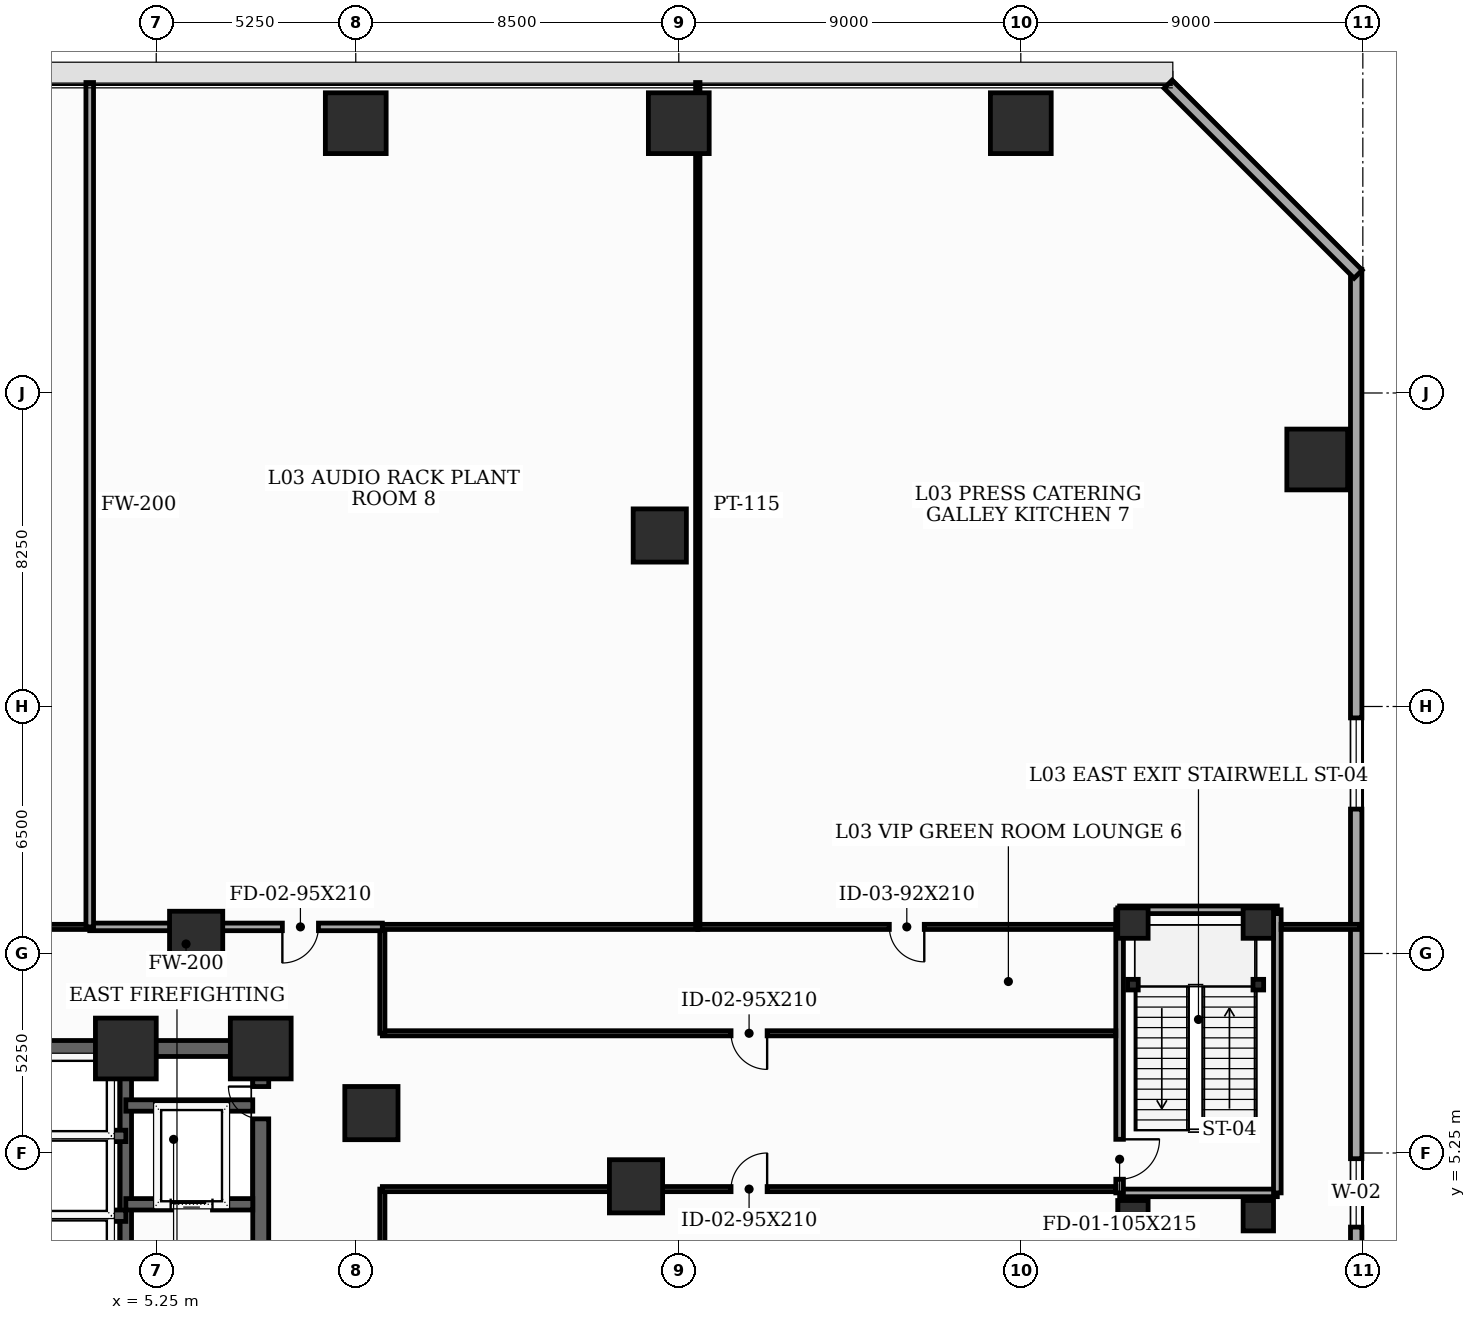
"""IFC4 building model, lengths in metres.
Left out: names, types, materials, properties, quantities, classifications, styles, units other than length and angle.
Written with IfcOpenShell. Run it as: python <this file> out.ifc"""

import sys

from ifc_helpers import new_model, si_unit, direction, frame, frame_2d, origin, origin_2d, place, context, subcontext, project, spatial, rectangle, i_section, extrude, element, fill, save


model = new_model("IFC4")
c1 = context("Model", 3, precision=1e-05, world=origin(), true_north=direction((0.0, 1.0)))
c2 = subcontext(c1, "Body", "Model", "MODEL_VIEW")
j1 = project(units=[si_unit("LENGTHUNIT", "METRE"), si_unit("PLANEANGLEUNIT", "RADIAN")], contexts=[c1])
p1 = place(None, origin())
s1 = spatial("IfcSite", under=j1, at=p1, CompositionType="ELEMENT")
p2 = place(p1, origin())
s2 = spatial("IfcBuilding", under=s1, at=p2, CompositionType="ELEMENT")
p3 = place(p2, frame((0.0, 0.0, 15.6)))
s3 = spatial("IfcBuildingStorey", under=s2, at=p3, CompositionType="ELEMENT", Elevation=15.6)
for number, where, z_axis, x_axis in (
    (1, (8.0, 8.0, 0.0), (0.0, 0.0, 1.0), (1.0, 0.0, 0.0)),
    (2, (4.45, 8.0, 0.0), (0.0, 0.0, 1.0), (1.0, 0.0, 0.0)),
):
    element("IfcColumn", number, at=place(p3, frame(where, z_axis=z_axis, x_axis=x_axis)), inside=s3, PredefinedType="COLUMN", context=c2, shape_type="SweptSolid", body=[
        extrude(rectangle(XDim=1.6, YDim=1.6, at=origin_2d()), origin(), (0.0, 0.0, 1.0), 5.2),
    ])
for number, where, z_axis, x_axis in (
    (3, (10.912, 6.3, 0.0), (0.0, 0.0, 1.0), (1.0, 0.0, 0.0)),
    (4, (6.3, 10.912, 0.0), (0.0, 0.0, 1.0), (1.0, 0.0, 0.0)),
):
    element("IfcColumn", number, at=place(p3, frame(where, z_axis=z_axis, x_axis=x_axis)), inside=s3, PredefinedType="COLUMN", context=c2, shape_type="SweptSolid", body=[
        extrude(rectangle(XDim=1.4, YDim=1.4, at=origin_2d()), origin(), (0.0, 0.0, 1.0), 5.2),
    ])
for number, where, z_axis, x_axis in (
    (5, (35.8, 23.5, 0.0), (0.0, 0.0, 1.0), (1.0, 0.0, 0.0)),
    (6, (28.0, 32.35, 0.0), (0.0, 0.0, 1.0), (1.0, 0.0, 0.0)),
    (7, (19.0, 32.35, 0.0), (0.0, 0.0, 1.0), (1.0, 0.0, 0.0)),
    (8, (10.5, 32.35, 0.0), (0.0, 0.0, 1.0), (1.0, 0.0, 0.0)),
):
    element("IfcColumn", number, at=place(p3, frame(where, z_axis=z_axis, x_axis=x_axis)), inside=s3, PredefinedType="COLUMN", context=c2, shape_type="SweptSolid", body=[
        extrude(rectangle(XDim=1.6, YDim=1.6, at=origin_2d()), origin(), (0.0, 0.0, 1.0), 5.2),
    ])
for number, where, z_axis, x_axis in (
    (9, (18.5, 21.5, 0.0), (0.0, 0.0, 1.0), (1.0, 0.0, 0.0)),
    (10, (17.875, 4.373, 0.0), (0.0, 0.0, 1.0), (1.0, 0.0, 0.0)),
):
    element("IfcColumn", number, at=place(p3, frame(where, z_axis=z_axis, x_axis=x_axis)), inside=s3, PredefinedType="COLUMN", context=c2, shape_type="SweptSolid", body=[
        extrude(rectangle(XDim=1.4, YDim=1.4, at=origin_2d()), origin(), (0.0, 0.0, 1.0), 5.2),
    ])
for number, where, z_axis, x_axis in (
    (11, (30.95, 3.6, 0.0), (0.0, 0.0, 1.0), (1.0, 0.0, 0.0)),
    (12, (34.25, 3.6, 0.0), (0.0, 0.0, 1.0), (1.0, 0.0, 0.0)),
    (13, (34.25, 11.3, 0.0), (0.0, 0.0, 1.0), (1.0, 0.0, 0.0)),
    (14, (30.95, 11.3, 0.0), (0.0, 0.0, 1.0), (1.0, 0.0, 0.0)),
):
    element("IfcColumn", number, at=place(p3, frame(where, z_axis=z_axis, x_axis=x_axis)), inside=s3, PredefinedType="COLUMN", context=c2, shape_type="SweptSolid", body=[
        extrude(rectangle(XDim=0.8, YDim=0.8, at=origin_2d()), origin(), (0.0, 0.0, 1.0), 5.2),
    ])
for number, where, z_axis, x_axis in (
    (15, (30.95, 9.68, 0.0), (0.0, 0.0, 1.0), (1.0, 0.0, 0.0)),
    (16, (34.25, 9.68, 0.0), (0.0, 0.0, 1.0), (1.0, 0.0, 0.0)),
):
    element("IfcColumn", number, at=place(p3, frame(where, z_axis=z_axis, x_axis=x_axis)), inside=s3, PredefinedType="PILASTER", context=c2, shape_type="SweptSolid", body=[
        extrude(i_section(OverallWidth=0.28, OverallDepth=0.28, WebThickness=0.01, FlangeThickness=0.018, at=origin_2d()), origin(), (0.0, 0.0, 1.0), 5.2),
    ])
p4 = place(p3, frame((36.825, -19.5, 0.0), z_axis=(0.0, 0.0, 1.0), x_axis=(0.0, 1.0, 0.0)))
e17 = element("IfcWall", 17, at=p4, inside=s3, PredefinedType="SOLIDWALL", context=c2, shape_type="SweptSolid", body=[
    extrude(rectangle(XDim=48.0, YDim=0.3, at=frame_2d((24.0, 0.0))), origin(), (0.0, 0.0, 1.0), 4.95),
])
p5 = place(p4, frame((3.6, 0.0, 0.9)))
e18 = element("IfcOpeningElement", 18, at=p5, cuts=e17, PredefinedType="OPENING", context=c2, shape_type="SweptSolid", body=[
    extrude(rectangle(XDim=2.4, YDim=1.35, at=frame_2d((1.2, 0.675))), frame((0.0, 0.16, 0.0), z_axis=(0.0, -1.0, 0.0), x_axis=(1.0, 0.0, 0.0)), (0.0, 0.0, 1.0), 0.32),
])
p6 = place(p4, frame((22.8, 0.0, 0.9)))
e19 = element("IfcOpeningElement", 19, at=p6, cuts=e17, PredefinedType="OPENING", context=c2, shape_type="SweptSolid", body=[
    extrude(rectangle(XDim=1.8, YDim=1.35, at=frame_2d((0.9, 0.675))), frame((0.0, 0.16, 0.0), z_axis=(0.0, -1.0, 0.0), x_axis=(1.0, 0.0, 0.0)), (0.0, 0.0, 1.0), 0.32),
])
p7 = place(p4, frame((33.8, 0.0, 0.9)))
e20 = element("IfcOpeningElement", 20, at=p7, cuts=e17, PredefinedType="OPENING", context=c2, shape_type="SweptSolid", body=[
    extrude(rectangle(XDim=2.4, YDim=1.35, at=frame_2d((1.2, 0.675))), frame((0.0, 0.16, 0.0), z_axis=(0.0, -1.0, 0.0), x_axis=(1.0, 0.0, 0.0)), (0.0, 0.0, 1.0), 0.32),
])
p8 = place(p3, frame((36.876, 28.376, 0.0), z_axis=(0.0, 0.0, 1.0), x_axis=(-0.707106781187, 0.707106781187, 0.0)))
e21 = element("IfcWall", 21, at=p8, inside=s3, PredefinedType="SOLIDWALL", context=c2, shape_type="SweptSolid", body=[
    extrude(rectangle(XDim=7.071, YDim=0.3, at=frame_2d((3.536, 0.0))), origin(), (0.0, 0.0, 1.0), 4.95),
])
p9 = place(p3, frame((8.0, -8.0, 0.0), z_axis=(0.0, 0.0, 1.0), x_axis=(0.0, 1.0, 0.0)))
e22 = element("IfcWall", 22, at=p9, inside=s3, PredefinedType="SHEAR", context=c2, shape_type="SweptSolid", body=[
    extrude(rectangle(XDim=16.0, YDim=0.42, at=frame_2d((8.0, 0.0))), origin(), (0.0, 0.0, 1.0), 4.95),
])
p10 = place(p9, frame((9.6, 0.0, 0.0)))
e23 = element("IfcOpeningElement", 23, at=p10, cuts=e22, PredefinedType="OPENING", context=c2, shape_type="SweptSolid", body=[
    extrude(rectangle(XDim=1.05, YDim=2.15, at=frame_2d((0.525, 1.075))), frame((0.0, 0.22, 0.0), z_axis=(0.0, -1.0, 0.0), x_axis=(1.0, 0.0, 0.0)), (0.0, 0.0, 1.0), 0.44),
])
p11 = place(p9, frame((14.148, 0.0, 0.0)))
e24 = element("IfcOpeningElement", 24, at=p11, cuts=e22, PredefinedType="OPENING", context=c2, shape_type="SweptSolid", body=[
    extrude(rectangle(XDim=0.85, YDim=2.02, at=frame_2d((0.425, 1.01))), frame((0.0, 0.22, 0.0), z_axis=(0.0, -1.0, 0.0), x_axis=(1.0, 0.0, 0.0)), (0.0, 0.0, 1.0), 0.44),
])
p12 = place(p3, frame((-8.0, 8.0, 0.0), z_axis=(0.0, 0.0, 1.0), x_axis=(1.0, 0.0, 0.0)))
e25 = element("IfcWall", 25, at=p12, inside=s3, PredefinedType="SHEAR", context=c2, shape_type="SweptSolid", body=[
    extrude(rectangle(XDim=16.0, YDim=0.42, at=frame_2d((8.0, 0.0))), origin(), (0.0, 0.0, 1.0), 4.95),
])
p13 = place(p12, frame((7.1, 0.0, 0.0)))
e26 = element("IfcOpeningElement", 26, at=p13, cuts=e25, PredefinedType="OPENING", context=c2, shape_type="SweptSolid", body=[
    extrude(rectangle(XDim=1.8, YDim=2.15, at=frame_2d((0.9, 1.075))), frame((0.0, 0.22, 0.0), z_axis=(0.0, -1.0, 0.0), x_axis=(1.0, 0.0, 0.0)), (0.0, 0.0, 1.0), 0.44),
])
p14 = place(p3, frame((4.45, -7.79, 0.0), z_axis=(0.0, 0.0, 1.0), x_axis=(0.0, 1.0, 0.0)))
e27 = element("IfcWall", 27, at=p14, inside=s3, PredefinedType="SHEAR", context=c2, shape_type="SweptSolid", body=[
    extrude(rectangle(XDim=15.58, YDim=0.3, at=frame_2d((7.79, 0.0))), origin(), (0.0, 0.0, 1.0), 4.95),
])
p15 = place(p3, frame((4.45, 3.9, 0.0), z_axis=(0.0, 0.0, 1.0), x_axis=(1.0, 0.0, 0.0)))
e28 = element("IfcWall", 28, at=p15, inside=s3, PredefinedType="SHEAR", context=c2, shape_type="SweptSolid", body=[
    extrude(rectangle(XDim=3.34, YDim=0.3, at=frame_2d((1.67, 0.0))), origin(), (0.0, 0.0, 1.0), 4.95),
])
p16 = place(p15, frame((1.18, 0.0, 0.0)))
e29 = element("IfcOpeningElement", 29, at=p16, cuts=e28, PredefinedType="OPENING", context=c2, shape_type="SweptSolid", body=[
    extrude(rectangle(XDim=1.1, YDim=2.1, at=frame_2d((0.55, 1.05))), frame((0.0, 0.16, 0.0), z_axis=(0.0, -1.0, 0.0), x_axis=(1.0, 0.0, 0.0)), (0.0, 0.0, 1.0), 0.32),
])
p17 = place(p3, frame((4.45, 6.5, 0.0), z_axis=(0.0, 0.0, 1.0), x_axis=(1.0, 0.0, 0.0)))
e30 = element("IfcWall", 30, at=p17, inside=s3, PredefinedType="SHEAR", context=c2, shape_type="SweptSolid", body=[
    extrude(rectangle(XDim=3.34, YDim=0.3, at=frame_2d((1.67, 0.0))), origin(), (0.0, 0.0, 1.0), 4.95),
])
for number, where, z_axis, x_axis in (
    (31, (1.68, 3.6, 0.0), (0.0, 0.0, 1.0), (1.0, 0.0, 0.0)),
    (32, (1.68, 5.7, 0.0), (0.0, 0.0, 1.0), (1.0, 0.0, 0.0)),
):
    element("IfcWall", number, at=place(p3, frame(where, z_axis=z_axis, x_axis=x_axis)), inside=s3, PredefinedType="SHEAR", context=c2, shape_type="SweptSolid", body=[
        extrude(rectangle(XDim=2.77, YDim=0.3, at=frame_2d((1.385, 0.0))), origin(), (0.0, 0.0, 1.0), 4.95),
    ])
p18 = place(p3, frame((30.6, 4.2, 0.0), z_axis=(0.0, 0.0, 1.0), x_axis=(1.0, 0.0, 0.0)))
e33 = element("IfcWall", 33, at=p18, inside=s3, PredefinedType="SOLIDWALL", context=c2, shape_type="SweptSolid", body=[
    extrude(rectangle(XDim=4.15, YDim=0.2, at=frame_2d((2.075, 0.0))), origin(), (0.0, 0.0, 1.0), 4.95),
])
p19 = place(p3, frame((34.75, 4.2, 0.0), z_axis=(0.0, 0.0, 1.0), x_axis=(0.0, 1.0, 0.0)))
e34 = element("IfcWall", 34, at=p19, inside=s3, PredefinedType="SOLIDWALL", context=c2, shape_type="SweptSolid", body=[
    extrude(rectangle(XDim=7.45, YDim=0.2, at=frame_2d((3.725, 0.0))), origin(), (0.0, 0.0, 1.0), 4.95),
])
p20 = place(p3, frame((34.75, 11.65, 0.0), z_axis=(0.0, 0.0, 1.0), x_axis=(-1.0, 0.0, 0.0)))
e35 = element("IfcWall", 35, at=p20, inside=s3, PredefinedType="SOLIDWALL", context=c2, shape_type="SweptSolid", body=[
    extrude(rectangle(XDim=4.15, YDim=0.2, at=frame_2d((2.075, 0.0))), origin(), (0.0, 0.0, 1.0), 4.95),
])
p21 = place(p3, frame((30.6, 11.65, 0.0), z_axis=(0.0, 0.0, 1.0), x_axis=(0.0, -1.0, 0.0)))
e36 = element("IfcWall", 36, at=p21, inside=s3, PredefinedType="SOLIDWALL", context=c2, shape_type="SweptSolid", body=[
    extrude(rectangle(XDim=7.45, YDim=0.2, at=frame_2d((3.725, 0.0))), origin(), (0.0, 0.0, 1.0), 4.95),
])
p22 = place(p21, frame((6.04, 0.0, 0.0)))
e37 = element("IfcOpeningElement", 37, at=p22, cuts=e36, PredefinedType="OPENING", context=c2, shape_type="SweptSolid", body=[
    extrude(rectangle(XDim=1.05, YDim=2.15, at=frame_2d((0.525, 1.075))), frame((0.0, 0.11, 0.0), z_axis=(0.0, -1.0, 0.0), x_axis=(1.0, 0.0, 0.0)), (0.0, 0.0, 1.0), 0.22),
])
p23 = place(p3, frame((11.2, -7.4, 0.0), z_axis=(0.0, 0.0, 1.0), x_axis=(0.0, 1.0, 0.0)))
e38 = element("IfcWall", 38, at=p23, inside=s3, PredefinedType="PARTITIONING", context=c2, shape_type="SweptSolid", body=[
    extrude(rectangle(XDim=11.7, YDim=0.135, at=frame_2d((5.85, 0.0))), origin(), (0.0, 0.0, 1.0), 4.235),
])
p24 = place(p3, frame((11.2, 4.3, 0.0), z_axis=(0.0, 0.0, 1.0), x_axis=(1.0, 0.0, 0.0)))
e39 = element("IfcWall", 39, at=p24, inside=s3, PredefinedType="PARTITIONING", context=c2, shape_type="SweptSolid", body=[
    extrude(rectangle(XDim=19.3, YDim=0.135, at=frame_2d((9.65, 0.0))), origin(), (0.0, 0.0, 1.0), 3.435),
])
p25 = place(p24, frame((9.175, 0.0, 0.0)))
e40 = element("IfcOpeningElement", 40, at=p25, cuts=e39, PredefinedType="OPENING", context=c2, shape_type="SweptSolid", body=[
    extrude(rectangle(XDim=0.95, YDim=2.1, at=frame_2d((0.475, 1.05))), frame((0.0, 0.077, 0.0), z_axis=(0.0, -1.0, 0.0), x_axis=(1.0, 0.0, 0.0)), (0.0, 0.0, 1.0), 0.155),
])
p26 = place(p3, frame((30.5, 8.4, 0.0), z_axis=(0.0, 0.0, 1.0), x_axis=(-1.0, 0.0, 0.0)))
e41 = element("IfcWall", 41, at=p26, inside=s3, PredefinedType="PARTITIONING", context=c2, shape_type="SweptSolid", body=[
    extrude(rectangle(XDim=19.3, YDim=0.135, at=frame_2d((9.65, 0.0))), origin(), (0.0, 0.0, 1.0), 4.235),
])
p27 = place(p26, frame((9.175, 0.0, 0.0)))
e42 = element("IfcOpeningElement", 42, at=p27, cuts=e41, PredefinedType="OPENING", context=c2, shape_type="SweptSolid", body=[
    extrude(rectangle(XDim=0.95, YDim=2.1, at=frame_2d((0.475, 1.05))), frame((0.0, 0.077, 0.0), z_axis=(0.0, -1.0, 0.0), x_axis=(1.0, 0.0, 0.0)), (0.0, 0.0, 1.0), 0.155),
])
p28 = place(p3, frame((11.2, 8.4, 0.0), z_axis=(0.0, 0.0, 1.0), x_axis=(0.0, 1.0, 0.0)))
e43 = element("IfcWall", 43, at=p28, inside=s3, PredefinedType="PARTITIONING", context=c2, shape_type="SweptSolid", body=[
    extrude(rectangle(XDim=2.8, YDim=0.135, at=frame_2d((1.4, 0.0))), origin(), (0.0, 0.0, 1.0), 4.95),
])
p29 = place(p3, frame((11.2, 11.2, 0.0), z_axis=(0.0, 0.0, 1.0), x_axis=(-1.0, 0.0, 0.0)))
e44 = element("IfcWall", 44, at=p29, inside=s3, PredefinedType="SOLIDWALL", context=c2, shape_type="SweptSolid", body=[
    extrude(rectangle(XDim=7.7, YDim=0.2, at=frame_2d((3.85, 0.0))), origin(), (0.0, 0.0, 1.0), 3.435),
])
p30 = place(p29, frame((1.681, 0.0, 0.0)))
e45 = element("IfcOpeningElement", 45, at=p30, cuts=e44, PredefinedType="OPENING", context=c2, shape_type="SweptSolid", body=[
    extrude(rectangle(XDim=0.95, YDim=2.1, at=frame_2d((0.475, 1.05))), frame((0.0, 0.11, 0.0), z_axis=(0.0, -1.0, 0.0), x_axis=(1.0, 0.0, 0.0)), (0.0, 0.0, 1.0), 0.22),
])
p31 = place(p3, frame((3.5, 11.2, 0.0), z_axis=(0.0, 0.0, 1.0), x_axis=(-1.0, 0.0, 0.0)))
e46 = element("IfcWall", 46, at=p31, inside=s3, PredefinedType="PARTITIONING", context=c2, shape_type="SweptSolid", body=[
    extrude(rectangle(XDim=14.7, YDim=0.135, at=frame_2d((7.35, 0.0))), origin(), (0.0, 0.0, 1.0), 3.435),
])
p32 = place(p31, frame((5.111, 0.0, 0.0)))
e47 = element("IfcOpeningElement", 47, at=p32, cuts=e46, PredefinedType="OPENING", context=c2, shape_type="SweptSolid", body=[
    extrude(rectangle(XDim=0.95, YDim=2.1, at=frame_2d((0.475, 1.05))), frame((0.0, 0.077, 0.0), z_axis=(0.0, -1.0, 0.0), x_axis=(1.0, 0.0, 0.0)), (0.0, 0.0, 1.0), 0.155),
])
p33 = place(p3, frame((36.92, 11.2, 0.0), z_axis=(0.0, 0.0, 1.0), x_axis=(-1.0, 0.0, 0.0)))
e48 = element("IfcWall", 48, at=p33, inside=s3, PredefinedType="PARTITIONING", context=c2, shape_type="SweptSolid", body=[
    extrude(rectangle(XDim=2.07, YDim=0.135, at=frame_2d((1.035, 0.0))), origin(), (0.0, 0.0, 1.0), 4.235),
])
p34 = place(p3, frame((30.5, 11.2, 0.0), z_axis=(0.0, 0.0, 1.0), x_axis=(-1.0, 0.0, 0.0)))
e49 = element("IfcWall", 49, at=p34, inside=s3, PredefinedType="PARTITIONING", context=c2, shape_type="SweptSolid", body=[
    extrude(rectangle(XDim=11.0, YDim=0.135, at=frame_2d((5.5, 0.0))), origin(), (0.0, 0.0, 1.0), 4.95),
])
p35 = place(p34, frame((5.04, 0.0, 0.0)))
e50 = element("IfcOpeningElement", 50, at=p35, cuts=e49, PredefinedType="OPENING", context=c2, shape_type="SweptSolid", body=[
    extrude(rectangle(XDim=0.92, YDim=2.1, at=frame_2d((0.46, 1.05))), frame((0.0, 0.077, 0.0), z_axis=(0.0, -1.0, 0.0), x_axis=(1.0, 0.0, 0.0)), (0.0, 0.0, 1.0), 0.155),
])
p36 = place(p3, frame((19.5, 11.2, 0.0), z_axis=(0.0, 0.0, 1.0), x_axis=(-1.0, 0.0, 0.0)))
e51 = element("IfcWall", 51, at=p36, inside=s3, PredefinedType="PARTITIONING", context=c2, shape_type="SweptSolid", body=[
    extrude(rectangle(XDim=8.3, YDim=0.135, at=frame_2d((4.15, 0.0))), origin(), (0.0, 0.0, 1.0), 4.235),
])
p37 = place(p3, frame((19.5, 33.42, 0.0), z_axis=(0.0, 0.0, 1.0), x_axis=(0.0, -1.0, 0.0)))
e52 = element("IfcWall", 52, at=p37, inside=s3, PredefinedType="PARTITIONING", context=c2, shape_type="SweptSolid", body=[
    extrude(rectangle(XDim=22.22, YDim=0.115, at=frame_2d((11.11, 0.0))), origin(), (0.0, 0.0, 1.0), 3.435),
])
p38 = place(p3, frame((3.5, 33.42, 0.0), z_axis=(0.0, 0.0, 1.0), x_axis=(0.0, -1.0, 0.0)))
e53 = element("IfcWall", 53, at=p38, inside=s3, PredefinedType="SOLIDWALL", context=c2, shape_type="SweptSolid", body=[
    extrude(rectangle(XDim=22.22, YDim=0.2, at=frame_2d((11.11, 0.0))), origin(), (0.0, 0.0, 1.0), 4.235),
])
p39 = place(p6, origin())
e54 = element("IfcWindow", 54, at=p39, inside=s3, PartitioningType="SINGLE_PANEL", PredefinedType="WINDOW", context=c2, shape_type="SweptSolid", body=[
    extrude(rectangle(XDim=1.8, YDim=1.35, at=frame_2d((0.9, 0.675))), frame((0.0, 0.03, 0.0), z_axis=(0.0, -1.0, 0.0), x_axis=(1.0, 0.0, 0.0)), (0.0, 0.0, 1.0), 0.06),
])
fill(e19, e54)
p40 = place(p7, origin())
e55 = element("IfcWindow", 55, at=p40, inside=s3, PartitioningType="SINGLE_PANEL", PredefinedType="WINDOW", context=c2, shape_type="SweptSolid", body=[
    extrude(rectangle(XDim=2.4, YDim=1.35, at=frame_2d((1.2, 0.675))), frame((0.0, 0.03, 0.0), z_axis=(0.0, -1.0, 0.0), x_axis=(1.0, 0.0, 0.0)), (0.0, 0.0, 1.0), 0.06),
])
fill(e20, e55)
p41 = place(p11, origin())
e56 = element("IfcDoor", 56, at=p41, inside=s3, OperationType="SINGLE_SWING_RIGHT", PredefinedType="TRAPDOOR", context=c2, shape_type="SweptSolid", body=[
    extrude(rectangle(XDim=0.85, YDim=2.02, at=frame_2d((0.425, 1.01))), frame((0.0, 0.025, 0.0), z_axis=(0.0, -1.0, 0.0), x_axis=(1.0, 0.0, 0.0)), (0.0, 0.0, 1.0), 0.05),
])
fill(e24, e56)
p42 = place(p16, origin())
e57 = element("IfcDoor", 57, at=p42, inside=s3, OperationType="SLIDING_TO_LEFT", PredefinedType="DOOR", context=c2, shape_type="SweptSolid", body=[
    extrude(rectangle(XDim=1.1, YDim=2.1, at=frame_2d((0.55, 1.05))), frame((0.0, 0.025, 0.0), z_axis=(0.0, -1.0, 0.0), x_axis=(1.0, 0.0, 0.0)), (0.0, 0.0, 1.0), 0.05),
])
fill(e29, e57)
p43 = place(p22, origin())
e58 = element("IfcDoor", 58, at=p43, inside=s3, OperationType="SINGLE_SWING_LEFT", PredefinedType="DOOR", context=c2, shape_type="SweptSolid", body=[
    extrude(rectangle(XDim=1.05, YDim=2.15, at=frame_2d((0.525, 1.075))), frame((0.0, 0.025, 0.0), z_axis=(0.0, -1.0, 0.0), x_axis=(1.0, 0.0, 0.0)), (0.0, 0.0, 1.0), 0.05),
])
fill(e37, e58)
p44 = place(p25, origin())
e59 = element("IfcDoor", 59, at=p44, inside=s3, OperationType="SINGLE_SWING_RIGHT", PredefinedType="DOOR", context=c2, shape_type="SweptSolid", body=[
    extrude(rectangle(XDim=0.95, YDim=2.1, at=frame_2d((0.475, 1.05))), frame((0.0, 0.025, 0.0), z_axis=(0.0, -1.0, 0.0), x_axis=(1.0, 0.0, 0.0)), (0.0, 0.0, 1.0), 0.05),
])
fill(e40, e59)
p45 = place(p27, origin())
e60 = element("IfcDoor", 60, at=p45, inside=s3, OperationType="SINGLE_SWING_LEFT", PredefinedType="DOOR", context=c2, shape_type="SweptSolid", body=[
    extrude(rectangle(XDim=0.95, YDim=2.1, at=frame_2d((0.475, 1.05))), frame((0.0, 0.025, 0.0), z_axis=(0.0, -1.0, 0.0), x_axis=(1.0, 0.0, 0.0)), (0.0, 0.0, 1.0), 0.05),
])
fill(e42, e60)
p46 = place(p30, origin())
e61 = element("IfcDoor", 61, at=p46, inside=s3, OperationType="SINGLE_SWING_RIGHT", PredefinedType="DOOR", context=c2, shape_type="SweptSolid", body=[
    extrude(rectangle(XDim=0.95, YDim=2.1, at=frame_2d((0.475, 1.05))), frame((0.0, 0.025, 0.0), z_axis=(0.0, -1.0, 0.0), x_axis=(1.0, 0.0, 0.0)), (0.0, 0.0, 1.0), 0.05),
])
fill(e45, e61)
p47 = place(p35, origin())
e62 = element("IfcDoor", 62, at=p47, inside=s3, OperationType="SINGLE_SWING_LEFT", PredefinedType="DOOR", context=c2, shape_type="SweptSolid", body=[
    extrude(rectangle(XDim=0.92, YDim=2.1, at=frame_2d((0.46, 1.05))), frame((0.0, 0.025, 0.0), z_axis=(0.0, -1.0, 0.0), x_axis=(1.0, 0.0, 0.0)), (0.0, 0.0, 1.0), 0.05),
])
fill(e50, e62)
save(model, sys.argv[1])
